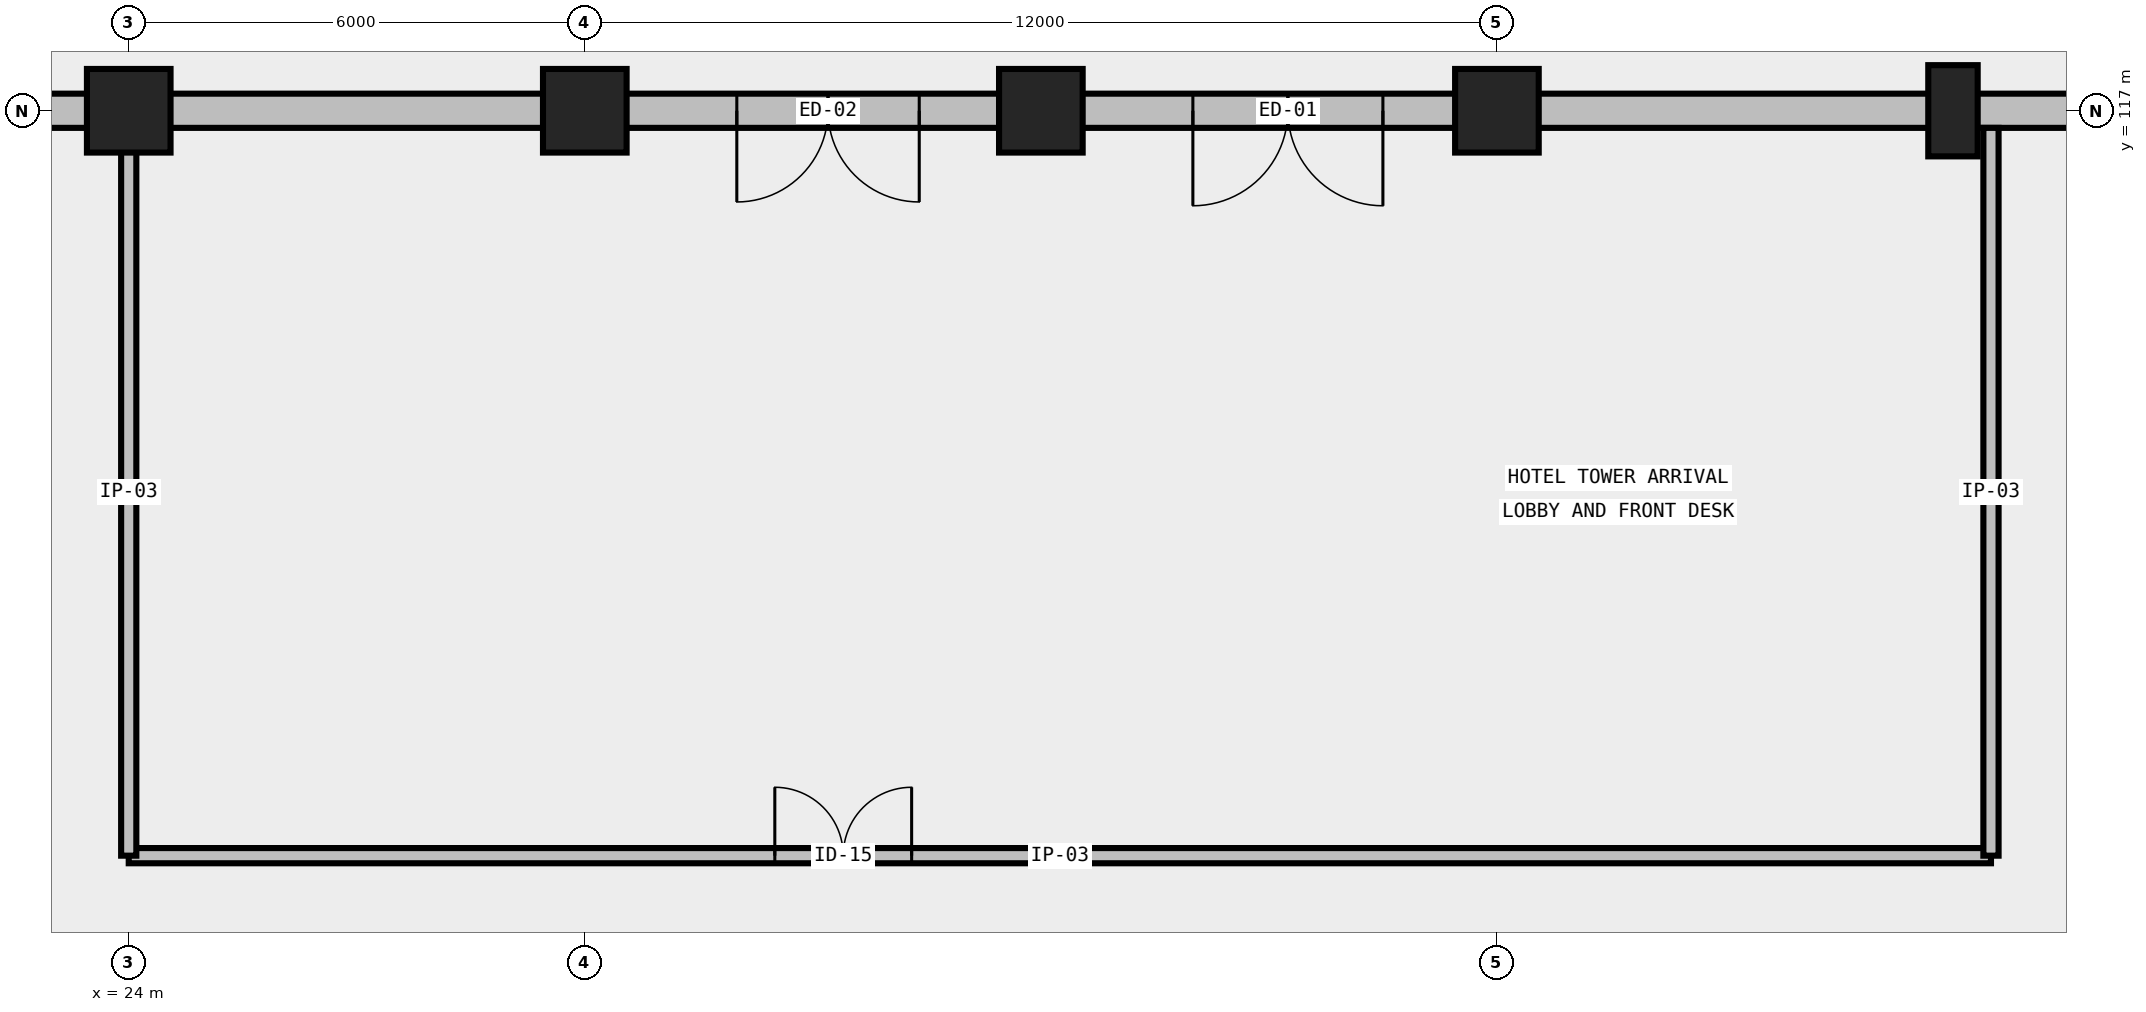
"""IFC4 building model, lengths in metres.
Left out: names, types, materials, properties, quantities, classifications, styles, units other than length and angle.
Written with IfcOpenShell. Run it as: python <this file> out.ifc"""

import sys

from ifc_helpers import new_model, si_unit, direction, frame, frame_2d, origin, origin_2d, place, context, subcontext, project, spatial, rectangle, extrude, element, fill, save


model = new_model("IFC4")
c1 = context("Model", 3, precision=1e-05, world=origin(), true_north=direction((0.0, 1.0)))
c2 = subcontext(c1, "Body", "Model", "MODEL_VIEW")
j1 = project(units=[si_unit("LENGTHUNIT", "METRE"), si_unit("PLANEANGLEUNIT", "RADIAN")], contexts=[c1])
p1 = place(None, origin())
s1 = spatial("IfcSite", under=j1, at=p1, CompositionType="ELEMENT")
p2 = place(p1, origin())
s2 = spatial("IfcBuilding", under=s1, at=p2, CompositionType="ELEMENT")
p3 = place(p2, origin())
s3 = spatial("IfcBuildingStorey", under=s2, at=p3, CompositionType="ELEMENT", Elevation=0.0)
for number, where, z_axis, x_axis in (
    (1, (24.0, 117.0, 0.0), (0.0, 0.0, 1.0), (1.0, 0.0, 0.0)),
    (2, (30.0, 117.0, 0.0), (0.0, 0.0, 1.0), (1.0, 0.0, 0.0)),
    (3, (36.0, 117.0, 0.0), (0.0, 0.0, 1.0), (1.0, 0.0, 0.0)),
    (4, (42.0, 117.0, 0.0), (0.0, 0.0, 1.0), (1.0, 0.0, 0.0)),
):
    element("IfcColumn", number, at=place(p3, frame(where, z_axis=z_axis, x_axis=x_axis)), inside=s3, PredefinedType="COLUMN", context=c2, shape_type="SweptSolid", body=[
        extrude(rectangle(XDim=1.1, YDim=1.1, at=origin_2d()), origin(), (0.0, 0.0, 1.0), 6.0),
    ])
p4 = place(p3, frame((48.0, 117.0, 0.0), z_axis=(0.0, 0.0, 1.0), x_axis=(1.0, 0.0, 0.0)))
e5 = element("IfcColumn", 5, at=p4, inside=s3, PredefinedType="PILASTER", context=c2, shape_type="SweptSolid", body=[
    extrude(rectangle(XDim=0.65, YDim=1.2, at=origin_2d()), origin(), (0.0, 0.0, 1.0), 6.0),
])
p5 = place(p3, frame((24.0, 117.0, 0.0), z_axis=(0.0, 0.0, 1.0), x_axis=(-1.0, 0.0, 0.0)))
e6 = element("IfcWall", 6, at=p5, inside=s3, PredefinedType="STANDARD", context=c2, shape_type="SweptSolid", body=[
    extrude(rectangle(XDim=12.0, YDim=0.45, at=frame_2d((6.0, 0.0))), origin(), (0.0, 0.0, 1.0), 4.676),
])
p6 = place(p5, frame((1.5, 0.0, 0.0)))
e7 = element("IfcOpeningElement", 7, at=p6, cuts=e6, PredefinedType="OPENING", context=c2, shape_type="SweptSolid", body=[
    extrude(rectangle(XDim=2.5, YDim=2.55, at=frame_2d((1.25, 1.275))), frame((0.0, 0.24, 0.0), z_axis=(0.0, -1.0, 0.0), x_axis=(1.0, 0.0, 0.0)), (0.0, 0.0, 1.0), 0.48),
])
p7 = place(p5, frame((7.6, 0.0, 0.0)))
e8 = element("IfcOpeningElement", 8, at=p7, cuts=e6, PredefinedType="OPENING", context=c2, shape_type="SweptSolid", body=[
    extrude(rectangle(XDim=2.4, YDim=2.5, at=frame_2d((1.2, 1.25))), frame((0.0, 0.24, 0.0), z_axis=(0.0, -1.0, 0.0), x_axis=(1.0, 0.0, 0.0)), (0.0, 0.0, 1.0), 0.48),
])
p8 = place(p3, frame((30.0, 117.0, 0.0), z_axis=(0.0, 0.0, 1.0), x_axis=(-1.0, 0.0, 0.0)))
e9 = element("IfcWall", 9, at=p8, inside=s3, PredefinedType="STANDARD", context=c2, shape_type="SweptSolid", body=[
    extrude(rectangle(XDim=6.0, YDim=0.45, at=frame_2d((3.0, 0.0))), origin(), (0.0, 0.0, 1.0), 4.676),
])
p9 = place(p3, frame((42.0, 117.0, 0.0), z_axis=(0.0, 0.0, 1.0), x_axis=(-1.0, 0.0, 0.0)))
e10 = element("IfcWall", 10, at=p9, inside=s3, PredefinedType="STANDARD", context=c2, shape_type="SweptSolid", body=[
    extrude(rectangle(XDim=12.0, YDim=0.45, at=frame_2d((6.0, 0.0))), origin(), (0.0, 0.0, 1.0), 4.676),
])
p10 = place(p9, frame((1.5, 0.0, 0.0)))
e11 = element("IfcOpeningElement", 11, at=p10, cuts=e10, PredefinedType="OPENING", context=c2, shape_type="SweptSolid", body=[
    extrude(rectangle(XDim=2.5, YDim=2.55, at=frame_2d((1.25, 1.275))), frame((0.0, 0.24, 0.0), z_axis=(0.0, -1.0, 0.0), x_axis=(1.0, 0.0, 0.0)), (0.0, 0.0, 1.0), 0.48),
])
p11 = place(p9, frame((7.6, 0.0, 0.0)))
e12 = element("IfcOpeningElement", 12, at=p11, cuts=e10, PredefinedType="OPENING", context=c2, shape_type="SweptSolid", body=[
    extrude(rectangle(XDim=2.4, YDim=2.5, at=frame_2d((1.2, 1.25))), frame((0.0, 0.24, 0.0), z_axis=(0.0, -1.0, 0.0), x_axis=(1.0, 0.0, 0.0)), (0.0, 0.0, 1.0), 0.48),
])
p12 = place(p3, frame((54.0, 117.0, 0.0), z_axis=(0.0, 0.0, 1.0), x_axis=(-1.0, 0.0, 0.0)))
e13 = element("IfcWall", 13, at=p12, inside=s3, PredefinedType="STANDARD", context=c2, shape_type="SweptSolid", body=[
    extrude(rectangle(XDim=12.0, YDim=0.45, at=frame_2d((6.0, 0.0))), origin(), (0.0, 0.0, 1.0), 4.676),
])
p13 = place(p3, frame((24.0, 107.2, 0.0), z_axis=(0.0, 0.0, 1.0), x_axis=(1.0, 0.0, 0.0)))
e14 = element("IfcWall", 14, at=p13, inside=s3, PredefinedType="PARTITIONING", context=c2, shape_type="SweptSolid", body=[
    extrude(rectangle(XDim=24.5, YDim=0.2, at=frame_2d((12.25, 0.0))), origin(), (0.0, 0.0, 1.0), 5.68),
])
p14 = place(p13, frame((8.5, 0.0, 0.0)))
e15 = element("IfcOpeningElement", 15, at=p14, cuts=e14, PredefinedType="OPENING", context=c2, shape_type="SweptSolid", body=[
    extrude(rectangle(XDim=1.8, YDim=2.3, at=frame_2d((0.9, 1.15))), frame((0.0, 0.115, 0.0), z_axis=(0.0, -1.0, 0.0), x_axis=(1.0, 0.0, 0.0)), (0.0, 0.0, 1.0), 0.23),
])
p15 = place(p3, frame((48.5, 107.2, 0.0), z_axis=(0.0, 0.0, 1.0), x_axis=(0.0, 1.0, 0.0)))
e16 = element("IfcWall", 16, at=p15, inside=s3, PredefinedType="PARTITIONING", context=c2, shape_type="SweptSolid", body=[
    extrude(rectangle(XDim=9.575, YDim=0.2, at=frame_2d((4.788, 0.0))), origin(), (0.0, 0.0, 1.0), 5.68),
])
p16 = place(p3, frame((24.0, 116.775, 0.0), z_axis=(0.0, 0.0, 1.0), x_axis=(0.0, -1.0, 0.0)))
e17 = element("IfcWall", 17, at=p16, inside=s3, PredefinedType="PARTITIONING", context=c2, shape_type="SweptSolid", body=[
    extrude(rectangle(XDim=9.575, YDim=0.2, at=frame_2d((4.788, 0.0))), origin(), (0.0, 0.0, 1.0), 4.83),
])
p17 = place(p10, origin())
e18 = element("IfcDoor", 18, at=p17, inside=s3, OperationType="DOUBLE_DOOR_SINGLE_SWING", PredefinedType="DOOR", context=c2, shape_type="SweptSolid", body=[
    extrude(rectangle(XDim=2.5, YDim=2.55, at=frame_2d((1.25, 1.275))), frame((0.0, 0.025, 0.0), z_axis=(0.0, -1.0, 0.0), x_axis=(1.0, 0.0, 0.0)), (0.0, 0.0, 1.0), 0.05),
])
fill(e11, e18)
p18 = place(p11, origin())
e19 = element("IfcDoor", 19, at=p18, inside=s3, OperationType="DOUBLE_DOOR_SINGLE_SWING", PredefinedType="DOOR", context=c2, shape_type="SweptSolid", body=[
    extrude(rectangle(XDim=2.4, YDim=2.5, at=frame_2d((1.2, 1.25))), frame((0.0, 0.025, 0.0), z_axis=(0.0, -1.0, 0.0), x_axis=(1.0, 0.0, 0.0)), (0.0, 0.0, 1.0), 0.05),
])
fill(e12, e19)
p19 = place(p14, origin())
e20 = element("IfcDoor", 20, at=p19, inside=s3, OperationType="DOUBLE_DOOR_SINGLE_SWING", PredefinedType="DOOR", context=c2, shape_type="SweptSolid", body=[
    extrude(rectangle(XDim=1.8, YDim=2.3, at=frame_2d((0.9, 1.15))), frame((0.0, 0.025, 0.0), z_axis=(0.0, -1.0, 0.0), x_axis=(1.0, 0.0, 0.0)), (0.0, 0.0, 1.0), 0.05),
])
fill(e15, e20)
save(model, sys.argv[1])
